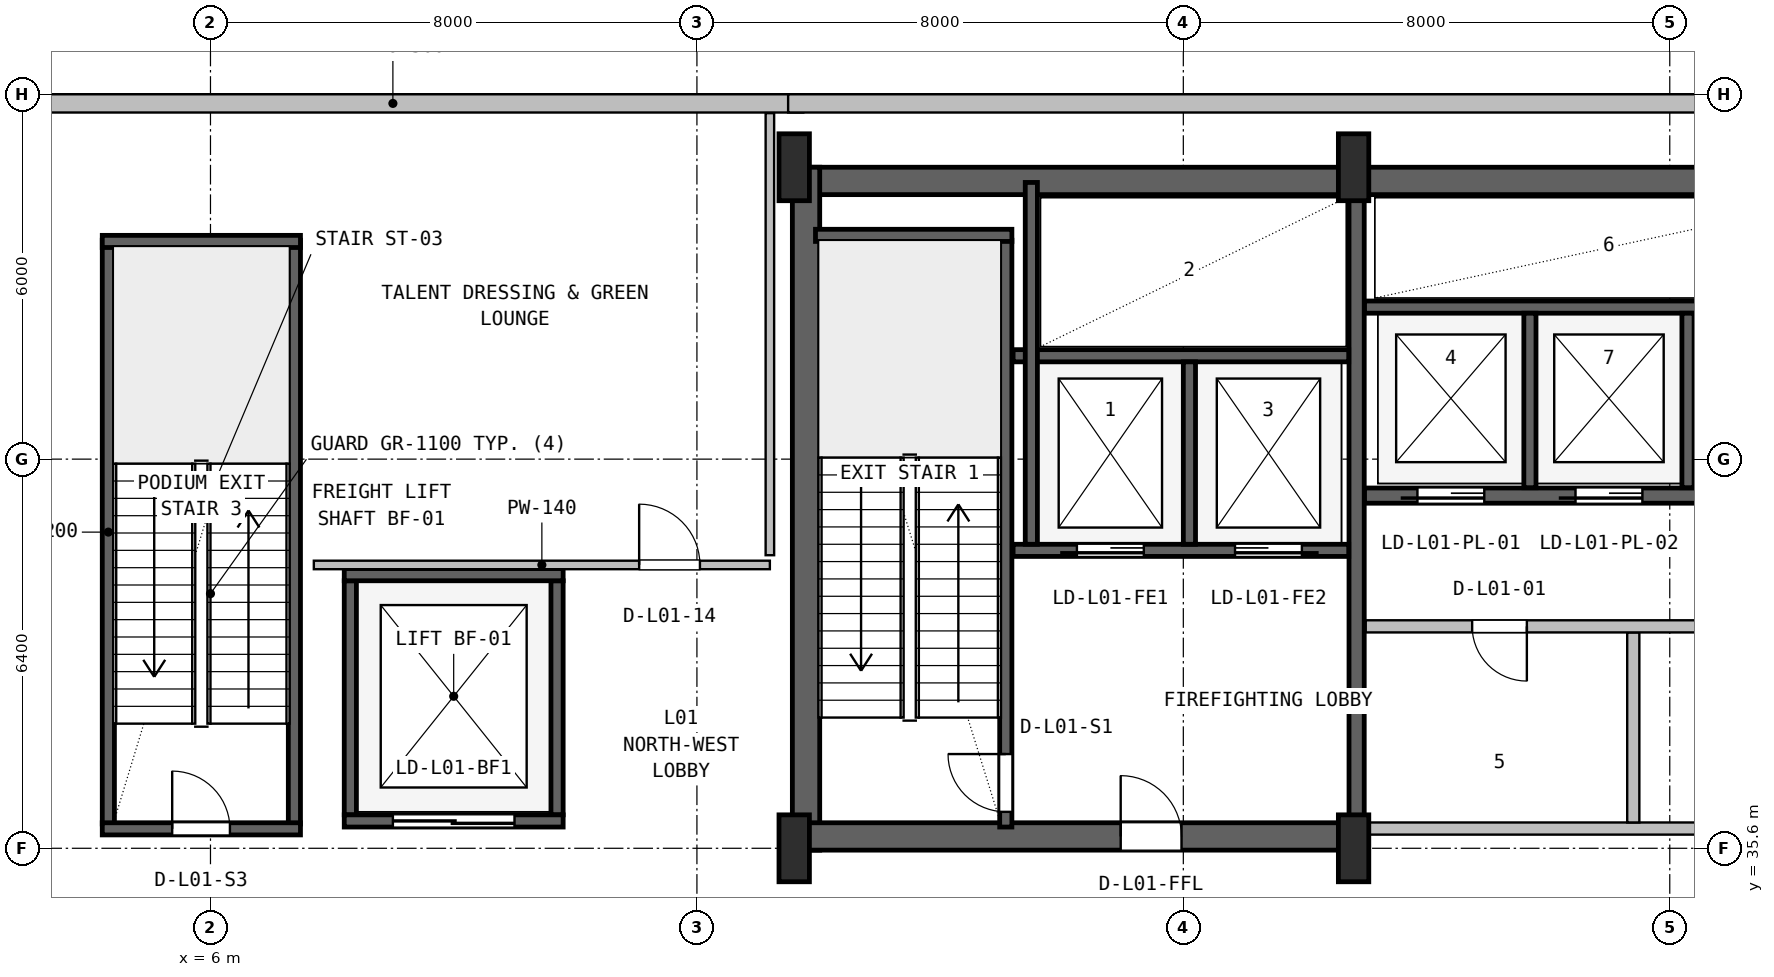
"""IFC4 building model, lengths in metres.
Left out: names, types, materials, properties, quantities, classifications, styles, units other than length and angle.
Written with IfcOpenShell. Run it as: python <this file> out.ifc"""

import sys

from ifc_helpers import new_model, si_unit, direction, frame, frame_2d, origin, origin_2d, place, context, subcontext, project, spatial, rectangle, i_section, extrude, source, transform, mapped, element, fill, save


model = new_model("IFC4")
c1 = context("Model", 3, precision=1e-05, world=origin(), true_north=direction((0.0, 1.0)))
c2 = subcontext(c1, "Body", "Model", "MODEL_VIEW")
j1 = project(units=[si_unit("LENGTHUNIT", "METRE"), si_unit("PLANEANGLEUNIT", "RADIAN")], contexts=[c1])
p1 = place(None, origin())
s1 = spatial("IfcSite", under=j1, at=p1, CompositionType="ELEMENT")
p2 = place(p1, origin())
s2 = spatial("IfcBuilding", under=s1, at=p2, CompositionType="ELEMENT")
p3 = place(p2, frame((0.0, 0.0, 6.0)))
s3 = spatial("IfcBuildingStorey", under=s2, at=p3, CompositionType="ELEMENT", Elevation=6.0)
p4 = place(p3, frame((15.6, 46.575, 0.0), z_axis=(0.0, 0.0, 1.0), x_axis=(1.0, 0.0, 0.0)))
e1 = element("IfcWall", 1, at=p4, inside=s3, PredefinedType="SHEAR", context=c2, shape_type="SweptSolid", body=[
    extrude(rectangle(XDim=36.8, YDim=0.45, at=frame_2d((18.4, 0.0))), origin(), (0.0, 0.0, 1.0), 5.12),
])
p5 = place(p3, frame((15.795, 35.57, 0.0), z_axis=(0.0, 0.0, 1.0), x_axis=(0.0, 1.0, 0.0)))
e2 = element("IfcWall", 2, at=p5, inside=s3, PredefinedType="SHEAR", context=c2, shape_type="SweptSolid", body=[
    extrude(rectangle(XDim=11.23, YDim=0.45, at=frame_2d((5.615, 0.0))), origin(), (0.0, 0.0, 1.0), 5.12),
])
p6 = place(p3, frame((15.57, 35.795, 0.0), z_axis=(0.0, 0.0, 1.0), x_axis=(1.0, 0.0, 0.0)))
e3 = element("IfcWall", 3, at=p6, inside=s3, PredefinedType="SHEAR", context=c2, shape_type="SweptSolid", body=[
    extrude(rectangle(XDim=9.23, YDim=0.45, at=frame_2d((4.615, 0.0))), origin(), (0.0, 0.0, 1.0), 5.12),
])
p7 = place(p6, frame((5.4, 0.0, 0.0)))
e4 = element("IfcOpeningElement", 4, at=p7, cuts=e3, PredefinedType="OPENING", context=c2, shape_type="SweptSolid", body=[
    extrude(rectangle(XDim=1.0, YDim=2.1, at=frame_2d((0.5, 1.05))), frame((0.0, 0.235, 0.0), z_axis=(0.0, -1.0, 0.0), x_axis=(1.0, 0.0, 0.0)), (0.0, 0.0, 1.0), 0.47),
])
m1 = source(origin(), c2, "Body", "SweptSolid", [
    extrude(i_section(OverallWidth=0.5, OverallDepth=1.1, WebThickness=0.018, FlangeThickness=0.032, FilletRadius=0.018, at=origin_2d()), origin(), (0.0, 0.0, 1.0), 5.4),
])
for number, where, z_axis, x_axis in (
    (5, (15.6, 35.6, 0.0), (0.0, 0.0, 1.0), (1.0, 0.0, 0.0)),
    (6, (15.6, 46.8, 0.0), (0.0, 0.0, 1.0), (1.0, 0.0, 0.0)),
    (7, (24.8, 35.6, 0.0), (0.0, 0.0, 1.0), (1.0, 0.0, 0.0)),
    (8, (24.8, 46.8, 0.0), (0.0, 0.0, 1.0), (1.0, 0.0, 0.0)),
):
    element("IfcColumn", number, at=place(p3, frame(where, z_axis=z_axis, x_axis=x_axis)), inside=s3, PredefinedType="COLUMN", context=c2, shape_type="MappedRepresentation", body=[
        mapped(m1, transform((0.0, 0.0, 0.0), x_axis=(1.0, 0.0, 0.0), y_axis=(0.0, 1.0, 0.0), z_axis=(0.0, 0.0, 1.0), scale=1.0)),
    ])
p8 = place(p3, frame((2.25, 47.85, 0.0), z_axis=(0.0, 0.0, 1.0), x_axis=(1.0, 0.0, 0.0)))
e9 = element("IfcWall", 9, at=p8, inside=s3, PredefinedType="SOLIDWALL", context=c2, shape_type="SweptSolid", body=[
    extrude(rectangle(XDim=13.5, YDim=0.3, at=frame_2d((6.75, 0.0))), origin(), (0.0, 0.0, 1.0), 5.1),
])
p9 = place(p3, frame((15.5, 47.85, 0.0), z_axis=(0.0, 0.0, 1.0), x_axis=(1.0, 0.0, 0.0)))
e10 = element("IfcWall", 10, at=p9, inside=s3, PredefinedType="SOLIDWALL", context=c2, shape_type="SweptSolid", body=[
    extrude(rectangle(XDim=37.0, YDim=0.3, at=frame_2d((18.5, 0.0))), origin(), (0.0, 0.0, 1.0), 5.1),
])
p10 = place(p3, frame((19.08, 35.95, 0.0), z_axis=(0.0, 0.0, 1.0), x_axis=(0.0, 1.0, 0.0)))
e11 = element("IfcWall", 11, at=p10, inside=s3, PredefinedType="SHEAR", context=c2, shape_type="SweptSolid", body=[
    extrude(rectangle(XDim=9.65, YDim=0.2, at=frame_2d((4.825, 0.0))), origin(), (0.0, 0.0, 1.0), 5.12),
])
p11 = place(p10, frame((0.25, 0.0, 0.0)))
e12 = element("IfcOpeningElement", 12, at=p11, cuts=e11, PredefinedType="OPENING", context=c2, shape_type="SweptSolid", body=[
    extrude(rectangle(XDim=0.95, YDim=2.1, at=frame_2d((0.475, 1.05))), frame((0.0, 0.11, 0.0), z_axis=(0.0, -1.0, 0.0), x_axis=(1.0, 0.0, 0.0)), (0.0, 0.0, 1.0), 0.22),
])
p12 = place(p3, frame((15.95, 45.68, 0.0), z_axis=(0.0, 0.0, 1.0), x_axis=(1.0, 0.0, 0.0)))
e13 = element("IfcWall", 13, at=p12, inside=s3, PredefinedType="SHEAR", context=c2, shape_type="SweptSolid", body=[
    extrude(rectangle(XDim=3.23, YDim=0.2, at=frame_2d((1.615, 0.0))), origin(), (0.0, 0.0, 1.0), 5.12),
])
p13 = place(p3, frame((24.85, 36.05, 0.0), z_axis=(0.0, 0.0, 1.0), x_axis=(0.0, 1.0, 0.0)))
e14 = element("IfcWall", 14, at=p13, inside=s3, PredefinedType="SHEAR", context=c2, shape_type="SweptSolid", body=[
    extrude(rectangle(XDim=10.45, YDim=0.25, at=frame_2d((5.225, 0.0))), origin(), (0.0, 0.0, 1.0), 5.12),
])
p14 = place(p3, frame((19.2, 40.5, 0.0), z_axis=(0.0, 0.0, 1.0), x_axis=(1.0, 0.0, 0.0)))
e15 = element("IfcWall", 15, at=p14, inside=s3, PredefinedType="SHEAR", context=c2, shape_type="SweptSolid", body=[
    extrude(rectangle(XDim=5.52, YDim=0.2, at=frame_2d((2.76, 0.0))), origin(), (0.0, 0.0, 1.0), 5.12),
])
p15 = place(p14, frame((1.05, 0.0, 0.0)))
e16 = element("IfcOpeningElement", 16, at=p15, cuts=e15, PredefinedType="OPENING", context=c2, shape_type="SweptSolid", body=[
    extrude(rectangle(XDim=1.1, YDim=2.18, at=frame_2d((0.55, 1.09))), frame((0.0, 0.11, 0.0), z_axis=(0.0, -1.0, 0.0), x_axis=(1.0, 0.0, 0.0)), (0.0, 0.0, 1.0), 0.22),
])
p16 = place(p14, frame((3.65, 0.0, 0.0)))
e17 = element("IfcOpeningElement", 17, at=p16, cuts=e15, PredefinedType="OPENING", context=c2, shape_type="SweptSolid", body=[
    extrude(rectangle(XDim=1.1, YDim=2.18, at=frame_2d((0.55, 1.09))), frame((0.0, 0.11, 0.0), z_axis=(0.0, -1.0, 0.0), x_axis=(1.0, 0.0, 0.0)), (0.0, 0.0, 1.0), 0.22),
])
p17 = place(p3, frame((19.2, 43.7, 0.0), z_axis=(0.0, 0.0, 1.0), x_axis=(1.0, 0.0, 0.0)))
e18 = element("IfcWall", 18, at=p17, inside=s3, PredefinedType="SHEAR", context=c2, shape_type="SweptSolid", body=[
    extrude(rectangle(XDim=5.52, YDim=0.2, at=frame_2d((2.76, 0.0))), origin(), (0.0, 0.0, 1.0), 5.12),
])
p18 = place(p3, frame((22.1, 40.6, 0.0), z_axis=(0.0, 0.0, 1.0), x_axis=(0.0, 1.0, 0.0)))
e19 = element("IfcWall", 19, at=p18, inside=s3, PredefinedType="SHEAR", context=c2, shape_type="SweptSolid", body=[
    extrude(rectangle(XDim=3.0, YDim=0.2, at=frame_2d((1.5, 0.0))), origin(), (0.0, 0.0, 1.0), 5.12),
])
p19 = place(p3, frame((19.5, 40.6, 0.0), z_axis=(0.0, 0.0, 1.0), x_axis=(0.0, 1.0, 0.0)))
e20 = element("IfcWall", 20, at=p19, inside=s3, PredefinedType="SHEAR", context=c2, shape_type="SweptSolid", body=[
    extrude(rectangle(XDim=5.95, YDim=0.2, at=frame_2d((2.975, 0.0))), origin(), (0.0, 0.0, 1.0), 5.12),
])
p20 = place(p3, frame((24.98, 41.4, 0.0), z_axis=(0.0, 0.0, 1.0), x_axis=(1.0, 0.0, 0.0)))
e21 = element("IfcWall", 21, at=p20, inside=s3, PredefinedType="SHEAR", context=c2, shape_type="SweptSolid", body=[
    extrude(rectangle(XDim=23.82, YDim=0.25, at=frame_2d((11.91, 0.0))), origin(), (0.0, 0.0, 1.0), 5.12),
])
p21 = place(p20, frame((0.87, 0.0, 0.0)))
e22 = element("IfcOpeningElement", 22, at=p21, cuts=e21, PredefinedType="OPENING", context=c2, shape_type="SweptSolid", body=[
    extrude(rectangle(XDim=1.1, YDim=2.18, at=frame_2d((0.55, 1.09))), frame((0.0, 0.135, 0.0), z_axis=(0.0, -1.0, 0.0), x_axis=(1.0, 0.0, 0.0)), (0.0, 0.0, 1.0), 0.27),
])
p22 = place(p20, frame((3.47, 0.0, 0.0)))
e23 = element("IfcOpeningElement", 23, at=p22, cuts=e21, PredefinedType="OPENING", context=c2, shape_type="SweptSolid", body=[
    extrude(rectangle(XDim=1.1, YDim=2.18, at=frame_2d((0.55, 1.09))), frame((0.0, 0.135, 0.0), z_axis=(0.0, -1.0, 0.0), x_axis=(1.0, 0.0, 0.0)), (0.0, 0.0, 1.0), 0.27),
])
p23 = place(p20, frame((6.07, 0.0, 0.0)))
e24 = element("IfcOpeningElement", 24, at=p23, cuts=e21, PredefinedType="OPENING", context=c2, shape_type="SweptSolid", body=[
    extrude(rectangle(XDim=1.1, YDim=2.18, at=frame_2d((0.55, 1.09))), frame((0.0, 0.135, 0.0), z_axis=(0.0, -1.0, 0.0), x_axis=(1.0, 0.0, 0.0)), (0.0, 0.0, 1.0), 0.27),
])
p24 = place(p3, frame((24.98, 44.5, 0.0), z_axis=(0.0, 0.0, 1.0), x_axis=(1.0, 0.0, 0.0)))
e25 = element("IfcWall", 25, at=p24, inside=s3, PredefinedType="SHEAR", context=c2, shape_type="SweptSolid", body=[
    extrude(rectangle(XDim=7.87, YDim=0.2, at=frame_2d((3.935, 0.0))), origin(), (0.0, 0.0, 1.0), 5.12),
])
for number, where, z_axis, x_axis in (
    (26, (27.7, 41.53, 0.0), (0.0, 0.0, 1.0), (0.0, 1.0, 0.0)),
    (27, (30.3, 41.53, 0.0), (0.0, 0.0, 1.0), (0.0, 1.0, 0.0)),
):
    element("IfcWall", number, at=place(p3, frame(where, z_axis=z_axis, x_axis=x_axis)), inside=s3, PredefinedType="SHEAR", context=c2, shape_type="SweptSolid", body=[
        extrude(rectangle(XDim=2.87, YDim=0.2, at=frame_2d((1.435, 0.0))), origin(), (0.0, 0.0, 1.0), 5.12),
    ])
for number, where, z_axis, x_axis in (
    (28, (4.32, 36.0, 0.0), (0.0, 0.0, 1.0), (0.0, 1.0, 0.0)),
    (29, (7.38, 36.0, 0.0), (0.0, 0.0, 1.0), (0.0, 1.0, 0.0)),
):
    element("IfcWall", number, at=place(p3, frame(where, z_axis=z_axis, x_axis=x_axis)), inside=s3, PredefinedType="SHEAR", context=c2, shape_type="SweptSolid", body=[
        extrude(rectangle(XDim=9.6, YDim=0.2, at=frame_2d((4.8, 0.0))), origin(), (0.0, 0.0, 1.0), 5.12),
    ])
p25 = place(p3, frame((4.22, 45.58, 0.0), z_axis=(0.0, 0.0, 1.0), x_axis=(1.0, 0.0, 0.0)))
e30 = element("IfcWall", 30, at=p25, inside=s3, PredefinedType="SHEAR", context=c2, shape_type="SweptSolid", body=[
    extrude(rectangle(XDim=3.26, YDim=0.2, at=frame_2d((1.63, 0.0))), origin(), (0.0, 0.0, 1.0), 5.12),
])
p26 = place(p3, frame((4.22, 35.92, 0.0), z_axis=(0.0, 0.0, 1.0), x_axis=(1.0, 0.0, 0.0)))
e31 = element("IfcWall", 31, at=p26, inside=s3, PredefinedType="SHEAR", context=c2, shape_type="SweptSolid", body=[
    extrude(rectangle(XDim=3.26, YDim=0.2, at=frame_2d((1.63, 0.0))), origin(), (0.0, 0.0, 1.0), 5.12),
])
p27 = place(p26, frame((1.15, 0.0, 0.0)))
e32 = element("IfcOpeningElement", 32, at=p27, cuts=e31, PredefinedType="OPENING", context=c2, shape_type="SweptSolid", body=[
    extrude(rectangle(XDim=0.95, YDim=2.1, at=frame_2d((0.475, 1.05))), frame((0.0, 0.11, 0.0), z_axis=(0.0, -1.0, 0.0), x_axis=(1.0, 0.0, 0.0)), (0.0, 0.0, 1.0), 0.22),
])
for number, where, z_axis, x_axis in (
    (33, (8.3, 36.15, 0.0), (0.0, 0.0, 1.0), (0.0, 1.0, 0.0)),
    (34, (11.7, 36.15, 0.0), (0.0, 0.0, 1.0), (0.0, 1.0, 0.0)),
):
    element("IfcWall", number, at=place(p3, frame(where, z_axis=z_axis, x_axis=x_axis)), inside=s3, PredefinedType="SHEAR", context=c2, shape_type="SweptSolid", body=[
        extrude(rectangle(XDim=3.85, YDim=0.2, at=frame_2d((1.925, 0.0))), origin(), (0.0, 0.0, 1.0), 5.12),
    ])
p28 = place(p3, frame((8.2, 40.1, 0.0), z_axis=(0.0, 0.0, 1.0), x_axis=(1.0, 0.0, 0.0)))
e35 = element("IfcWall", 35, at=p28, inside=s3, PredefinedType="SHEAR", context=c2, shape_type="SweptSolid", body=[
    extrude(rectangle(XDim=3.6, YDim=0.2, at=frame_2d((1.8, 0.0))), origin(), (0.0, 0.0, 1.0), 5.12),
])
p29 = place(p3, frame((8.2, 36.05, 0.0), z_axis=(0.0, 0.0, 1.0), x_axis=(1.0, 0.0, 0.0)))
e36 = element("IfcWall", 36, at=p29, inside=s3, PredefinedType="SHEAR", context=c2, shape_type="SweptSolid", body=[
    extrude(rectangle(XDim=3.6, YDim=0.2, at=frame_2d((1.8, 0.0))), origin(), (0.0, 0.0, 1.0), 5.12),
])
p30 = place(p29, frame((0.8, 0.0, 0.0)))
e37 = element("IfcOpeningElement", 37, at=p30, cuts=e36, PredefinedType="OPENING", context=c2, shape_type="SweptSolid", body=[
    extrude(rectangle(XDim=2.0, YDim=2.28, at=frame_2d((1.0, 1.14))), frame((0.0, 0.11, 0.0), z_axis=(0.0, -1.0, 0.0), x_axis=(1.0, 0.0, 0.0)), (0.0, 0.0, 1.0), 0.22),
])
p31 = place(p3, frame((25.0, 35.925, 0.0), z_axis=(0.0, 0.0, 1.0), x_axis=(1.0, 0.0, 0.0)))
e38 = element("IfcWall", 38, at=p31, inside=s3, PredefinedType="PLUMBINGWALL", context=c2, shape_type="SweptSolid", body=[
    extrude(rectangle(XDim=9.75, YDim=0.2, at=frame_2d((4.875, 0.0))), origin(), (0.0, 0.0, 1.0), 4.183),
])
p32 = place(p3, frame((29.4, 36.025, 0.0), z_axis=(0.0, 0.0, 1.0), x_axis=(0.0, 1.0, 0.0)))
e39 = element("IfcWall", 39, at=p32, inside=s3, PredefinedType="PLUMBINGWALL", context=c2, shape_type="SweptSolid", body=[
    extrude(rectangle(XDim=3.125, YDim=0.2, at=frame_2d((1.562, 0.0))), origin(), (0.0, 0.0, 1.0), 5.1),
])
p33 = place(p3, frame((25.0, 39.25, 0.0), z_axis=(0.0, 0.0, 1.0), x_axis=(1.0, 0.0, 0.0)))
e40 = element("IfcWall", 40, at=p33, inside=s3, PredefinedType="PLUMBINGWALL", context=c2, shape_type="SweptSolid", body=[
    extrude(rectangle(XDim=9.75, YDim=0.2, at=frame_2d((4.875, 0.0))), origin(), (0.0, 0.0, 1.0), 5.1),
])
p34 = place(p33, frame((1.75, 0.0, 0.0)))
e41 = element("IfcOpeningElement", 41, at=p34, cuts=e40, PredefinedType="OPENING", context=c2, shape_type="SweptSolid", body=[
    extrude(rectangle(XDim=0.9, YDim=2.06, at=frame_2d((0.45, 1.03))), frame((0.0, 0.11, 0.0), z_axis=(0.0, -1.0, 0.0), x_axis=(1.0, 0.0, 0.0)), (0.0, 0.0, 1.0), 0.22),
])
p35 = place(p33, frame((6.725, 0.0, 0.0)))
e42 = element("IfcOpeningElement", 42, at=p35, cuts=e40, PredefinedType="OPENING", context=c2, shape_type="SweptSolid", body=[
    extrude(rectangle(XDim=0.9, YDim=2.06, at=frame_2d((0.45, 1.03))), frame((0.0, 0.11, 0.0), z_axis=(0.0, -1.0, 0.0), x_axis=(1.0, 0.0, 0.0)), (0.0, 0.0, 1.0), 0.22),
])
p36 = place(p3, frame((7.7, 40.26, 0.0), z_axis=(0.0, 0.0, 1.0), x_axis=(1.0, 0.0, 0.0)))
e43 = element("IfcWall", 43, at=p36, inside=s3, PredefinedType="PARTITIONING", context=c2, shape_type="SweptSolid", body=[
    extrude(rectangle(XDim=7.5, YDim=0.14, at=frame_2d((3.75, 0.0))), origin(), (0.0, 0.0, 1.0), 5.1),
])
p37 = place(p36, frame((5.35, 0.0, 0.0)))
e44 = element("IfcOpeningElement", 44, at=p37, cuts=e43, PredefinedType="OPENING", context=c2, shape_type="SweptSolid", body=[
    extrude(rectangle(XDim=1.0, YDim=2.1, at=frame_2d((0.5, 1.05))), frame((0.0, 0.08, 0.0), z_axis=(0.0, -1.0, 0.0), x_axis=(1.0, 0.0, 0.0)), (0.0, 0.0, 1.0), 0.16),
])
p38 = place(p3, frame((15.2, 40.42, 0.0), z_axis=(0.0, 0.0, 1.0), x_axis=(0.0, 1.0, 0.0)))
e45 = element("IfcWall", 45, at=p38, inside=s3, PredefinedType="PARTITIONING", context=c2, shape_type="SweptSolid", body=[
    extrude(rectangle(XDim=7.27, YDim=0.14, at=frame_2d((3.635, 0.0))), origin(), (0.0, 0.0, 1.0), 4.183),
])
m2 = source(origin(), c2, "Body", "SweptSolid", [
    extrude(rectangle(XDim=0.95, YDim=2.1, at=frame_2d((0.475, 1.05))), frame((0.0, 0.025, 0.0), z_axis=(0.0, -1.0, 0.0), x_axis=(1.0, 0.0, 0.0)), (0.0, 0.0, 1.0), 0.05),
])
p39 = place(p11, origin())
e46 = element("IfcDoor", 46, at=p39, inside=s3, OperationType="SINGLE_SWING_RIGHT", PredefinedType="DOOR", context=c2, shape_type="MappedRepresentation", body=[
    mapped(m2, transform((0.0, 0.0, 0.0), x_axis=(1.0, 0.0, 0.0), y_axis=(0.0, 1.0, 0.0), z_axis=(0.0, 0.0, 1.0), scale=1.0)),
])
fill(e12, e46)
m3 = source(origin(), c2, "Body", "SweptSolid", [
    extrude(rectangle(XDim=1.0, YDim=2.1, at=frame_2d((0.5, 1.05))), frame((0.0, 0.025, 0.0), z_axis=(0.0, -1.0, 0.0), x_axis=(1.0, 0.0, 0.0)), (0.0, 0.0, 1.0), 0.05),
])
p40 = place(p7, origin())
e47 = element("IfcDoor", 47, at=p40, inside=s3, OperationType="SINGLE_SWING_LEFT", PredefinedType="DOOR", context=c2, shape_type="MappedRepresentation", body=[
    mapped(m3, transform((0.0, 0.0, 0.0), x_axis=(1.0, 0.0, 0.0), y_axis=(0.0, 1.0, 0.0), z_axis=(0.0, 0.0, 1.0), scale=1.0)),
])
fill(e4, e47)
m4 = source(origin(), c2, "Body", "SweptSolid", [
    extrude(rectangle(XDim=1.1, YDim=2.18, at=frame_2d((0.55, 1.09))), frame((0.0, 0.025, 0.0), z_axis=(0.0, -1.0, 0.0), x_axis=(1.0, 0.0, 0.0)), (0.0, 0.0, 1.0), 0.05),
])
p41 = place(p15, frame((1.1, 0.0, 0.0), z_axis=(0.0, 0.0, 1.0), x_axis=(-1.0, 0.0, 0.0)))
e48 = element("IfcDoor", 48, at=p41, inside=s3, OperationType="SLIDING_TO_LEFT", PredefinedType="DOOR", context=c2, shape_type="MappedRepresentation", body=[
    mapped(m4, transform((0.0, 0.0, 0.0), x_axis=(1.0, 0.0, 0.0), y_axis=(0.0, 1.0, 0.0), z_axis=(0.0, 0.0, 1.0), scale=1.0)),
])
fill(e16, e48)
p42 = place(p16, frame((1.1, 0.0, 0.0), z_axis=(0.0, 0.0, 1.0), x_axis=(-1.0, 0.0, 0.0)))
e49 = element("IfcDoor", 49, at=p42, inside=s3, OperationType="SLIDING_TO_RIGHT", PredefinedType="DOOR", context=c2, shape_type="MappedRepresentation", body=[
    mapped(m4, transform((0.0, 0.0, 0.0), x_axis=(1.0, 0.0, 0.0), y_axis=(0.0, 1.0, 0.0), z_axis=(0.0, 0.0, 1.0), scale=1.0)),
])
fill(e17, e49)
p43 = place(p21, frame((1.1, 0.0, 0.0), z_axis=(0.0, 0.0, 1.0), x_axis=(-1.0, 0.0, 0.0)))
e50 = element("IfcDoor", 50, at=p43, inside=s3, OperationType="SLIDING_TO_LEFT", PredefinedType="DOOR", context=c2, shape_type="MappedRepresentation", body=[
    mapped(m4, transform((0.0, 0.0, 0.0), x_axis=(1.0, 0.0, 0.0), y_axis=(0.0, 1.0, 0.0), z_axis=(0.0, 0.0, 1.0), scale=1.0)),
])
fill(e22, e50)
p44 = place(p22, frame((1.1, 0.0, 0.0), z_axis=(0.0, 0.0, 1.0), x_axis=(-1.0, 0.0, 0.0)))
e51 = element("IfcDoor", 51, at=p44, inside=s3, OperationType="SLIDING_TO_LEFT", PredefinedType="DOOR", context=c2, shape_type="MappedRepresentation", body=[
    mapped(m4, transform((0.0, 0.0, 0.0), x_axis=(1.0, 0.0, 0.0), y_axis=(0.0, 1.0, 0.0), z_axis=(0.0, 0.0, 1.0), scale=1.0)),
])
fill(e23, e51)
p45 = place(p27, origin())
e52 = element("IfcDoor", 52, at=p45, inside=s3, OperationType="SINGLE_SWING_LEFT", PredefinedType="DOOR", context=c2, shape_type="MappedRepresentation", body=[
    mapped(m2, transform((0.0, 0.0, 0.0), x_axis=(1.0, 0.0, 0.0), y_axis=(0.0, 1.0, 0.0), z_axis=(0.0, 0.0, 1.0), scale=1.0)),
])
fill(e32, e52)
m5 = source(origin(), c2, "Body", "SweptSolid", [
    extrude(rectangle(XDim=2.0, YDim=2.28, at=frame_2d((1.0, 1.14))), frame((0.0, 0.025, 0.0), z_axis=(0.0, -1.0, 0.0), x_axis=(1.0, 0.0, 0.0)), (0.0, 0.0, 1.0), 0.05),
])
p46 = place(p30, frame((2.0, 0.0, 0.0), z_axis=(0.0, 0.0, 1.0), x_axis=(-1.0, 0.0, 0.0)))
e53 = element("IfcDoor", 53, at=p46, inside=s3, OperationType="DOUBLE_DOOR_SLIDING", PredefinedType="DOOR", context=c2, shape_type="MappedRepresentation", body=[
    mapped(m5, transform((0.0, 0.0, 0.0), x_axis=(1.0, 0.0, 0.0), y_axis=(0.0, 1.0, 0.0), z_axis=(0.0, 0.0, 1.0), scale=1.0)),
])
fill(e37, e53)
m6 = source(origin(), c2, "Body", "SweptSolid", [
    extrude(rectangle(XDim=0.9, YDim=2.06, at=frame_2d((0.45, 1.03))), frame((0.0, 0.025, 0.0), z_axis=(0.0, -1.0, 0.0), x_axis=(1.0, 0.0, 0.0)), (0.0, 0.0, 1.0), 0.05),
])
p47 = place(p34, frame((0.9, 0.0, 0.0), z_axis=(0.0, 0.0, 1.0), x_axis=(-1.0, 0.0, 0.0)))
e54 = element("IfcDoor", 54, at=p47, inside=s3, OperationType="SINGLE_SWING_RIGHT", PredefinedType="DOOR", context=c2, shape_type="MappedRepresentation", body=[
    mapped(m6, transform((0.0, 0.0, 0.0), x_axis=(1.0, 0.0, 0.0), y_axis=(0.0, 1.0, 0.0), z_axis=(0.0, 0.0, 1.0), scale=1.0)),
])
fill(e41, e54)
m7 = source(origin(), c2, "Body", "SweptSolid", [
    extrude(rectangle(XDim=1.0, YDim=2.1, at=frame_2d((0.5, 1.05))), frame((0.0, 0.025, 0.0), z_axis=(0.0, -1.0, 0.0), x_axis=(1.0, 0.0, 0.0)), (0.0, 0.0, 1.0), 0.05),
])
p48 = place(p37, origin())
e55 = element("IfcDoor", 55, at=p48, inside=s3, OperationType="SINGLE_SWING_LEFT", PredefinedType="DOOR", context=c2, shape_type="MappedRepresentation", body=[
    mapped(m7, transform((0.0, 0.0, 0.0), x_axis=(1.0, 0.0, 0.0), y_axis=(0.0, 1.0, 0.0), z_axis=(0.0, 0.0, 1.0), scale=1.0)),
])
fill(e44, e55)
save(model, sys.argv[1])
